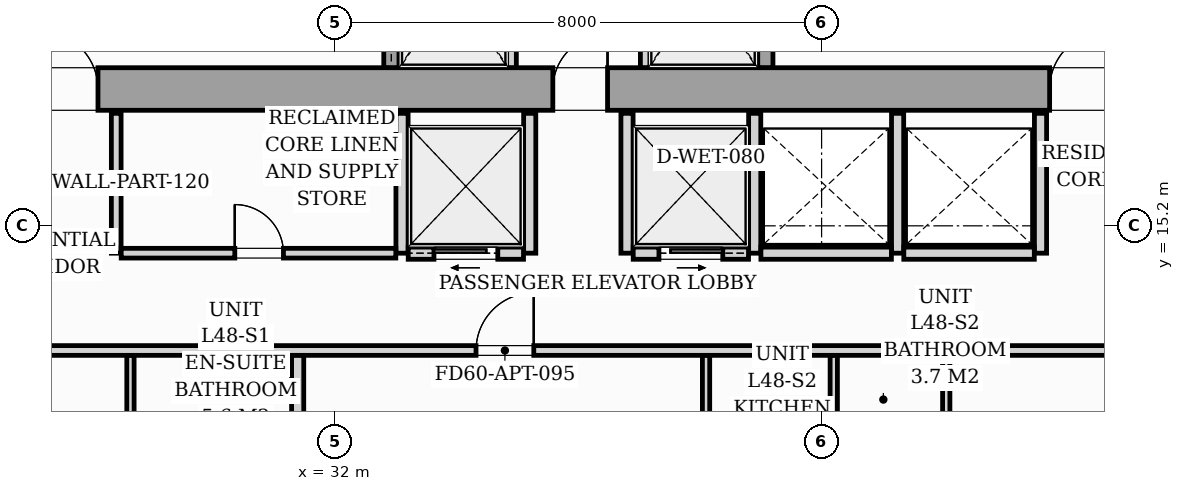
"""IFC4 building model, lengths in metres.
Left out: names, types, materials, properties, quantities, classifications, styles, units other than length and angle.
Written with IfcOpenShell. Run it as: python <this file> out.ifc"""

import sys

from ifc_helpers import new_model, si_unit, direction, frame, frame_2d, origin, origin_2d, place, context, subcontext, project, spatial, rectangle, i_section, extrude, source, transform, mapped, element, fill, save


model = new_model("IFC4")
c1 = context("Model", 3, precision=1e-05, world=origin(), true_north=direction((0.0, 1.0)))
c2 = subcontext(c1, "Body", "Model", "MODEL_VIEW")
j1 = project(units=[si_unit("LENGTHUNIT", "METRE"), si_unit("PLANEANGLEUNIT", "RADIAN")], contexts=[c1])
p1 = place(None, origin())
s1 = spatial("IfcSite", under=j1, at=p1, CompositionType="ELEMENT")
p2 = place(p1, origin())
s2 = spatial("IfcBuilding", under=s1, at=p2, CompositionType="ELEMENT")
p3 = place(p2, frame((0.0, 0.0, 167.8)))
s3 = spatial("IfcBuildingStorey", under=s2, at=p3, CompositionType="ELEMENT", Elevation=167.8)
m1 = source(origin(), c2, "Body", "SweptSolid", [
    extrude(i_section(OverallWidth=0.416, OverallDepth=0.446, WebThickness=0.039, FlangeThickness=0.063, FilletRadius=0.018, at=origin_2d()), origin(), (0.0, 0.0, 1.0), 5.196),
])
for number, where, z_axis, x_axis in (
    (1, (33.12, 17.4, 0.002), (0.0, 0.0, 1.0), (1.0, 0.0, 0.0)),
    (2, (38.88, 17.4, 0.002), (0.0, 0.0, 1.0), (1.0, 0.0, 0.0)),
):
    element("IfcColumn", number, at=place(p3, frame(where, z_axis=z_axis, x_axis=x_axis)), inside=s3, PredefinedType="PILASTER", context=c2, shape_type="MappedRepresentation", body=[
        mapped(m1, transform((0.0, 0.0, 0.0), scale=1.0)),
    ])
p4 = place(p3, frame((26.1, 17.45, 0.0), z_axis=(0.0, 0.0, 1.0), x_axis=(1.0, 0.0, 0.0)))
e3 = element("IfcWall", 3, at=p4, inside=s3, PredefinedType="SHEAR", context=c2, shape_type="SweptSolid", body=[
    extrude(rectangle(XDim=19.8, YDim=0.7, at=frame_2d((9.9, 0.0))), origin(), (0.0, 0.0, 1.0), 5.2),
])
p5 = place(p4, frame((1.05, 0.0, 0.0)))
e4 = element("IfcOpeningElement", 4, at=p5, cuts=e3, PredefinedType="OPENING", context=c2, shape_type="SweptSolid", body=[
    extrude(rectangle(XDim=0.95, YDim=2.06, at=frame_2d((0.475, 1.03))), frame((0.0, 0.36, 0.0), z_axis=(0.0, -1.0, 0.0), x_axis=(1.0, 0.0, 0.0)), (0.0, 0.0, 1.0), 0.72),
])
p6 = place(p4, frame((9.48, 0.0, 0.0)))
e5 = element("IfcOpeningElement", 5, at=p6, cuts=e3, PredefinedType="OPENING", context=c2, shape_type="SweptSolid", body=[
    extrude(rectangle(XDim=0.9, YDim=2.06, at=frame_2d((0.45, 1.03))), frame((0.0, 0.36, 0.0), z_axis=(0.0, -1.0, 0.0), x_axis=(1.0, 0.0, 0.0)), (0.0, 0.0, 1.0), 0.72),
])
p7 = place(p4, frame((17.65, 0.0, 0.0)))
e6 = element("IfcOpeningElement", 6, at=p7, cuts=e3, PredefinedType="OPENING", context=c2, shape_type="SweptSolid", body=[
    extrude(rectangle(XDim=0.95, YDim=2.06, at=frame_2d((0.475, 1.03))), frame((0.0, 0.36, 0.0), z_axis=(0.0, -1.0, 0.0), x_axis=(1.0, 0.0, 0.0)), (0.0, 0.0, 1.0), 0.72),
])
p8 = place(p3, frame((32.925, 17.802, 0.0), z_axis=(0.0, 0.0, 1.0), x_axis=(0.0, 1.0, 0.0)))
e7 = element("IfcWall", 7, at=p8, inside=s3, PredefinedType="SOLIDWALL", context=c2, shape_type="SweptSolid", body=[
    extrude(rectangle(XDim=2.646, YDim=0.25, at=frame_2d((1.323, 0.0))), origin(), (0.0, 0.0, 1.0), 5.2),
])
p9 = place(p8, frame((0.598, 0.0, 0.0)))
e8 = element("IfcOpeningElement", 8, at=p9, cuts=e7, PredefinedType="OPENING", context=c2, shape_type="SweptSolid", body=[
    extrude(rectangle(XDim=1.1, YDim=2.08, at=frame_2d((0.55, 1.04))), frame((0.0, 0.135, 0.0), z_axis=(0.0, -1.0, 0.0), x_axis=(1.0, 0.0, 0.0)), (0.0, 0.0, 1.0), 0.27),
])
for number, where, z_axis, x_axis in (
    (9, (34.9, 17.802, 0.0), (0.0, 0.0, 1.0), (0.0, 1.0, 0.0)),
    (10, (37.1, 17.802, 0.0), (0.0, 0.0, 1.0), (0.0, 1.0, 0.0)),
):
    element("IfcWall", number, at=place(p3, frame(where, z_axis=z_axis, x_axis=x_axis)), inside=s3, PredefinedType="PARTITIONING", context=c2, shape_type="SweptSolid", body=[
        extrude(rectangle(XDim=2.646, YDim=0.16, at=frame_2d((1.323, 0.0))), origin(), (0.0, 0.0, 1.0), 4.94),
    ])
p10 = place(p3, frame((39.075, 17.802, 0.0), z_axis=(0.0, 0.0, 1.0), x_axis=(0.0, 1.0, 0.0)))
e11 = element("IfcWall", 11, at=p10, inside=s3, PredefinedType="SOLIDWALL", context=c2, shape_type="SweptSolid", body=[
    extrude(rectangle(XDim=2.646, YDim=0.25, at=frame_2d((1.323, 0.0))), origin(), (0.0, 0.0, 1.0), 5.2),
])
p11 = place(p10, frame((0.598, 0.0, 0.0)))
e12 = element("IfcOpeningElement", 12, at=p11, cuts=e11, PredefinedType="OPENING", context=c2, shape_type="SweptSolid", body=[
    extrude(rectangle(XDim=1.1, YDim=2.08, at=frame_2d((0.55, 1.04))), frame((0.0, 0.135, 0.0), z_axis=(0.0, -1.0, 0.0), x_axis=(1.0, 0.0, 0.0)), (0.0, 0.0, 1.0), 0.27),
])
p12 = place(p3, frame((28.4, 14.75, 0.0), z_axis=(0.0, 0.0, 1.0), x_axis=(0.0, 1.0, 0.0)))
e13 = element("IfcWall", 13, at=p12, inside=s3, PredefinedType="PARTITIONING", context=c2, shape_type="SweptSolid", body=[
    extrude(rectangle(XDim=2.3, YDim=0.16, at=frame_2d((1.15, 0.0))), origin(), (0.0, 0.0, 1.0), 4.94),
])
p13 = place(p3, frame((33.1, 14.75, 0.0), z_axis=(0.0, 0.0, 1.0), x_axis=(0.0, 1.0, 0.0)))
e14 = element("IfcWall", 14, at=p13, inside=s3, PredefinedType="PARTITIONING", context=c2, shape_type="SweptSolid", body=[
    extrude(rectangle(XDim=2.3, YDim=0.2, at=frame_2d((1.15, 0.0))), origin(), (0.0, 0.0, 1.0), 4.94),
])
p14 = place(p3, frame((28.482, 14.75, 0.0), z_axis=(0.0, 0.0, 1.0), x_axis=(1.0, 0.0, 0.0)))
e15 = element("IfcWall", 15, at=p14, inside=s3, PredefinedType="PARTITIONING", context=c2, shape_type="SweptSolid", body=[
    extrude(rectangle(XDim=4.516, YDim=0.16, at=frame_2d((2.258, 0.0))), origin(), (0.0, 0.0, 1.0), 4.94),
])
p15 = place(p14, frame((1.868, 0.0, 0.0)))
e16 = element("IfcOpeningElement", 16, at=p15, cuts=e15, PredefinedType="OPENING", context=c2, shape_type="SweptSolid", body=[
    extrude(rectangle(XDim=0.8, YDim=2.05, at=frame_2d((0.4, 1.025))), frame((0.0, 0.09, 0.0), z_axis=(0.0, -1.0, 0.0), x_axis=(1.0, 0.0, 0.0)), (0.0, 0.0, 1.0), 0.18),
])
p16 = place(p3, frame((35.2, 14.75, 0.0), z_axis=(0.0, 0.0, 1.0), x_axis=(0.0, 1.0, 0.0)))
e17 = element("IfcWall", 17, at=p16, inside=s3, PredefinedType="PARTITIONING", context=c2, shape_type="SweptSolid", body=[
    extrude(rectangle(XDim=2.3, YDim=0.2, at=frame_2d((1.15, 0.0))), origin(), (0.0, 0.0, 1.0), 4.94),
])
p17 = place(p3, frame((33.202, 14.75, 0.0), z_axis=(0.0, 0.0, 1.0), x_axis=(1.0, 0.0, 0.0)))
e18 = element("IfcWall", 18, at=p17, inside=s3, PredefinedType="PARTITIONING", context=c2, shape_type="SweptSolid", body=[
    extrude(rectangle(XDim=1.896, YDim=0.2, at=frame_2d((0.948, 0.0))), origin(), (0.0, 0.0, 1.0), 4.94),
])
p18 = place(p17, frame((0.423, 0.0, 0.0)))
e19 = element("IfcOpeningElement", 19, at=p18, cuts=e18, PredefinedType="OPENING", context=c2, shape_type="SweptSolid", body=[
    extrude(rectangle(XDim=1.05, YDim=2.08, at=frame_2d((0.525, 1.04))), frame((0.0, 0.11, 0.0), z_axis=(0.0, -1.0, 0.0), x_axis=(1.0, 0.0, 0.0)), (0.0, 0.0, 1.0), 0.22),
])
for number, where, z_axis, x_axis in (
    (20, (36.8, 14.75, 0.0), (0.0, 0.0, 1.0), (0.0, 1.0, 0.0)),
    (21, (38.9, 14.75, 0.0), (0.0, 0.0, 1.0), (0.0, 1.0, 0.0)),
):
    element("IfcWall", number, at=place(p3, frame(where, z_axis=z_axis, x_axis=x_axis)), inside=s3, PredefinedType="PARTITIONING", context=c2, shape_type="SweptSolid", body=[
        extrude(rectangle(XDim=2.3, YDim=0.2, at=frame_2d((1.15, 0.0))), origin(), (0.0, 0.0, 1.0), 4.94),
    ])
p19 = place(p3, frame((36.902, 14.75, 0.0), z_axis=(0.0, 0.0, 1.0), x_axis=(1.0, 0.0, 0.0)))
e22 = element("IfcWall", 22, at=p19, inside=s3, PredefinedType="PARTITIONING", context=c2, shape_type="SweptSolid", body=[
    extrude(rectangle(XDim=1.896, YDim=0.2, at=frame_2d((0.948, 0.0))), origin(), (0.0, 0.0, 1.0), 4.94),
])
p20 = place(p19, frame((0.423, 0.0, 0.0)))
e23 = element("IfcOpeningElement", 23, at=p20, cuts=e22, PredefinedType="OPENING", context=c2, shape_type="SweptSolid", body=[
    extrude(rectangle(XDim=1.05, YDim=2.08, at=frame_2d((0.525, 1.04))), frame((0.0, 0.11, 0.0), z_axis=(0.0, -1.0, 0.0), x_axis=(1.0, 0.0, 0.0)), (0.0, 0.0, 1.0), 0.22),
])
for number, where, z_axis, x_axis in (
    (24, (41.25, 14.75, 0.0), (0.0, 0.0, 1.0), (0.0, 1.0, 0.0)),
    (25, (43.6, 14.75, 0.0), (0.0, 0.0, 1.0), (0.0, 1.0, 0.0)),
):
    element("IfcWall", number, at=place(p3, frame(where, z_axis=z_axis, x_axis=x_axis)), inside=s3, PredefinedType="PARTITIONING", context=c2, shape_type="SweptSolid", body=[
        extrude(rectangle(XDim=2.3, YDim=0.2, at=frame_2d((1.15, 0.0))), origin(), (0.0, 0.0, 1.0), 4.94),
    ])
for number, where, z_axis, x_axis in (
    (26, (39.002, 14.75, 0.0), (0.0, 0.0, 1.0), (1.0, 0.0, 0.0)),
    (27, (41.352, 14.75, 0.0), (0.0, 0.0, 1.0), (1.0, 0.0, 0.0)),
):
    element("IfcWall", number, at=place(p3, frame(where, z_axis=z_axis, x_axis=x_axis)), inside=s3, PredefinedType="PARTITIONING", context=c2, shape_type="SweptSolid", body=[
        extrude(rectangle(XDim=2.146, YDim=0.2, at=frame_2d((1.073, 0.0))), origin(), (0.0, 0.0, 1.0), 4.94),
    ])
p21 = place(p3, frame((22.6, 13.15, 0.0), z_axis=(0.0, 0.0, 1.0), x_axis=(1.0, 0.0, 0.0)))
e28 = element("IfcWall", 28, at=p21, inside=s3, PredefinedType="PARTITIONING", context=c2, shape_type="SweptSolid", body=[
    extrude(rectangle(XDim=23.28, YDim=0.16, at=frame_2d((11.64, 0.0))), origin(), (0.0, 0.0, 1.0), 4.94),
])
p22 = place(p21, frame((0.607, 0.0, 0.0)))
e29 = element("IfcOpeningElement", 29, at=p22, cuts=e28, PredefinedType="OPENING", context=c2, shape_type="SweptSolid", body=[
    extrude(rectangle(XDim=0.95, YDim=2.06, at=frame_2d((0.475, 1.03))), frame((0.0, 0.09, 0.0), z_axis=(0.0, -1.0, 0.0), x_axis=(1.0, 0.0, 0.0)), (0.0, 0.0, 1.0), 0.18),
])
p23 = place(p21, frame((11.717, 0.0, 0.0)))
e30 = element("IfcOpeningElement", 30, at=p23, cuts=e28, PredefinedType="OPENING", context=c2, shape_type="SweptSolid", body=[
    extrude(rectangle(XDim=0.95, YDim=2.06, at=frame_2d((0.475, 1.03))), frame((0.0, 0.09, 0.0), z_axis=(0.0, -1.0, 0.0), x_axis=(1.0, 0.0, 0.0)), (0.0, 0.0, 1.0), 0.18),
])
p24 = place(p3, frame((28.634, 7.503, 0.0), z_axis=(0.0, 0.0, 1.0), x_axis=(0.0, 1.0, 0.0)))
e31 = element("IfcWall", 31, at=p24, inside=s3, PredefinedType="PARTITIONING", context=c2, shape_type="SweptSolid", body=[
    extrude(rectangle(XDim=5.565, YDim=0.12, at=frame_2d((2.782, 0.0))), origin(), (0.0, 0.0, 1.0), 4.94),
])
p25 = place(p24, frame((2.297, 0.0, 0.0)))
e32 = element("IfcOpeningElement", 32, at=p25, cuts=e31, PredefinedType="OPENING", context=c2, shape_type="SweptSolid", body=[
    extrude(rectangle(XDim=0.9, YDim=2.05, at=frame_2d((0.45, 1.025))), frame((0.0, 0.07, 0.0), z_axis=(0.0, -1.0, 0.0), x_axis=(1.0, 0.0, 0.0)), (0.0, 0.0, 1.0), 0.14),
])
p26 = place(p3, frame((31.384, 10.912, 0.0), z_axis=(0.0, 0.0, 1.0), x_axis=(0.0, 1.0, 0.0)))
e33 = element("IfcWall", 33, at=p26, inside=s3, PredefinedType="PARTITIONING", context=c2, shape_type="SweptSolid", body=[
    extrude(rectangle(XDim=2.156, YDim=0.2, at=frame_2d((1.078, 0.0))), origin(), (0.0, 0.0, 1.0), 4.94),
])
p27 = place(p3, frame((42.05, 8.612, 0.0), z_axis=(0.0, 0.0, 1.0), x_axis=(0.0, 1.0, 0.0)))
e34 = element("IfcWall", 34, at=p27, inside=s3, PredefinedType="PARTITIONING", context=c2, shape_type="SweptSolid", body=[
    extrude(rectangle(XDim=4.456, YDim=0.12, at=frame_2d((2.228, 0.0))), origin(), (0.0, 0.0, 1.0), 4.94),
])
p28 = place(p27, frame((2.386, 0.0, 0.0)))
e35 = element("IfcOpeningElement", 35, at=p28, cuts=e34, PredefinedType="OPENING", context=c2, shape_type="SweptSolid", body=[
    extrude(rectangle(XDim=0.9, YDim=2.05, at=frame_2d((0.45, 1.025))), frame((0.0, 0.07, 0.0), z_axis=(0.0, -1.0, 0.0), x_axis=(1.0, 0.0, 0.0)), (0.0, 0.0, 1.0), 0.14),
])
p29 = place(p3, frame((40.2, 10.962, 0.0), z_axis=(0.0, 0.0, 1.0), x_axis=(0.0, 1.0, 0.0)))
e36 = element("IfcWall", 36, at=p29, inside=s3, PredefinedType="PARTITIONING", context=c2, shape_type="SweptSolid", body=[
    extrude(rectangle(XDim=2.106, YDim=0.12, at=frame_2d((1.053, 0.0))), origin(), (0.0, 0.0, 1.0), 4.94),
])
p30 = place(p3, frame((38.1, 10.962, 0.0), z_axis=(0.0, 0.0, 1.0), x_axis=(0.0, 1.0, 0.0)))
e37 = element("IfcWall", 37, at=p30, inside=s3, PredefinedType="PARTITIONING", context=c2, shape_type="SweptSolid", body=[
    extrude(rectangle(XDim=2.106, YDim=0.12, at=frame_2d((1.053, 0.0))), origin(), (0.0, 0.0, 1.0), 4.94),
])
p31 = place(p30, frame((0.18, 0.0, 0.0)))
e38 = element("IfcOpeningElement", 38, at=p31, cuts=e37, PredefinedType="OPENING", context=c2, shape_type="SweptSolid", body=[
    extrude(rectangle(XDim=0.85, YDim=2.05, at=frame_2d((0.425, 1.025))), frame((0.0, 0.07, 0.0), z_axis=(0.0, -1.0, 0.0), x_axis=(1.0, 0.0, 0.0)), (0.0, 0.0, 1.0), 0.14),
])
m2 = source(origin(), c2, "Body", "SweptSolid", [
    extrude(rectangle(XDim=0.95, YDim=2.06, at=frame_2d((0.475, 1.03))), frame((0.0, 0.025, 0.0), z_axis=(0.0, -1.0, 0.0), x_axis=(1.0, 0.0, 0.0)), (0.0, 0.0, 1.0), 0.05),
])
p32 = place(p5, origin())
e39 = element("IfcDoor", 39, at=p32, inside=s3, OperationType="SINGLE_SWING_LEFT", PredefinedType="DOOR", context=c2, shape_type="MappedRepresentation", body=[
    mapped(m2, transform((0.0, 0.0, 0.0), scale=1.0)),
])
fill(e4, e39)
m3 = source(origin(), c2, "Body", "SweptSolid", [
    extrude(rectangle(XDim=0.9, YDim=2.06, at=frame_2d((0.45, 1.03))), frame((0.0, 0.025, 0.0), z_axis=(0.0, -1.0, 0.0), x_axis=(1.0, 0.0, 0.0)), (0.0, 0.0, 1.0), 0.05),
])
p33 = place(p6, origin())
e40 = element("IfcDoor", 40, at=p33, inside=s3, OperationType="SINGLE_SWING_RIGHT", PredefinedType="DOOR", context=c2, shape_type="MappedRepresentation", body=[
    mapped(m3, transform((0.0, 0.0, 0.0), scale=1.0)),
])
fill(e5, e40)
p34 = place(p7, origin())
e41 = element("IfcDoor", 41, at=p34, inside=s3, OperationType="SINGLE_SWING_RIGHT", PredefinedType="DOOR", context=c2, shape_type="MappedRepresentation", body=[
    mapped(m2, transform((0.0, 0.0, 0.0), scale=1.0)),
])
fill(e6, e41)
m4 = source(origin(), c2, "Body", "SweptSolid", [
    extrude(rectangle(XDim=0.8, YDim=2.05, at=frame_2d((0.4, 1.025))), frame((0.0, 0.025, 0.0), z_axis=(0.0, -1.0, 0.0), x_axis=(1.0, 0.0, 0.0)), (0.0, 0.0, 1.0), 0.05),
])
p35 = place(p15, origin())
e42 = element("IfcDoor", 42, at=p35, inside=s3, OperationType="SINGLE_SWING_LEFT", PredefinedType="DOOR", context=c2, shape_type="MappedRepresentation", body=[
    mapped(m4, transform((0.0, 0.0, 0.0), scale=1.0)),
])
fill(e16, e42)
m5 = source(origin(), c2, "Body", "SweptSolid", [
    extrude(rectangle(XDim=1.05, YDim=2.08, at=frame_2d((0.525, 1.04))), frame((0.0, 0.025, 0.0), z_axis=(0.0, -1.0, 0.0), x_axis=(1.0, 0.0, 0.0)), (0.0, 0.0, 1.0), 0.05),
])
p36 = place(p18, origin())
e43 = element("IfcDoor", 43, at=p36, inside=s3, OperationType="SLIDING_TO_LEFT", PredefinedType="DOOR", context=c2, shape_type="MappedRepresentation", body=[
    mapped(m5, transform((0.0, 0.0, 0.0), scale=1.0)),
])
fill(e19, e43)
p37 = place(p20, origin())
e44 = element("IfcDoor", 44, at=p37, inside=s3, OperationType="SLIDING_TO_RIGHT", PredefinedType="DOOR", context=c2, shape_type="MappedRepresentation", body=[
    mapped(m5, transform((0.0, 0.0, 0.0), scale=1.0)),
])
fill(e23, e44)
m6 = source(origin(), c2, "Body", "SweptSolid", [
    extrude(rectangle(XDim=0.95, YDim=2.06, at=frame_2d((0.475, 1.03))), frame((0.0, 0.025, 0.0), z_axis=(0.0, -1.0, 0.0), x_axis=(1.0, 0.0, 0.0)), (0.0, 0.0, 1.0), 0.05),
])
p38 = place(p23, origin())
e45 = element("IfcDoor", 45, at=p38, inside=s3, OperationType="SINGLE_SWING_RIGHT", PredefinedType="DOOR", context=c2, shape_type="MappedRepresentation", body=[
    mapped(m6, transform((0.0, 0.0, 0.0), scale=1.0)),
])
fill(e30, e45)
save(model, sys.argv[1])
